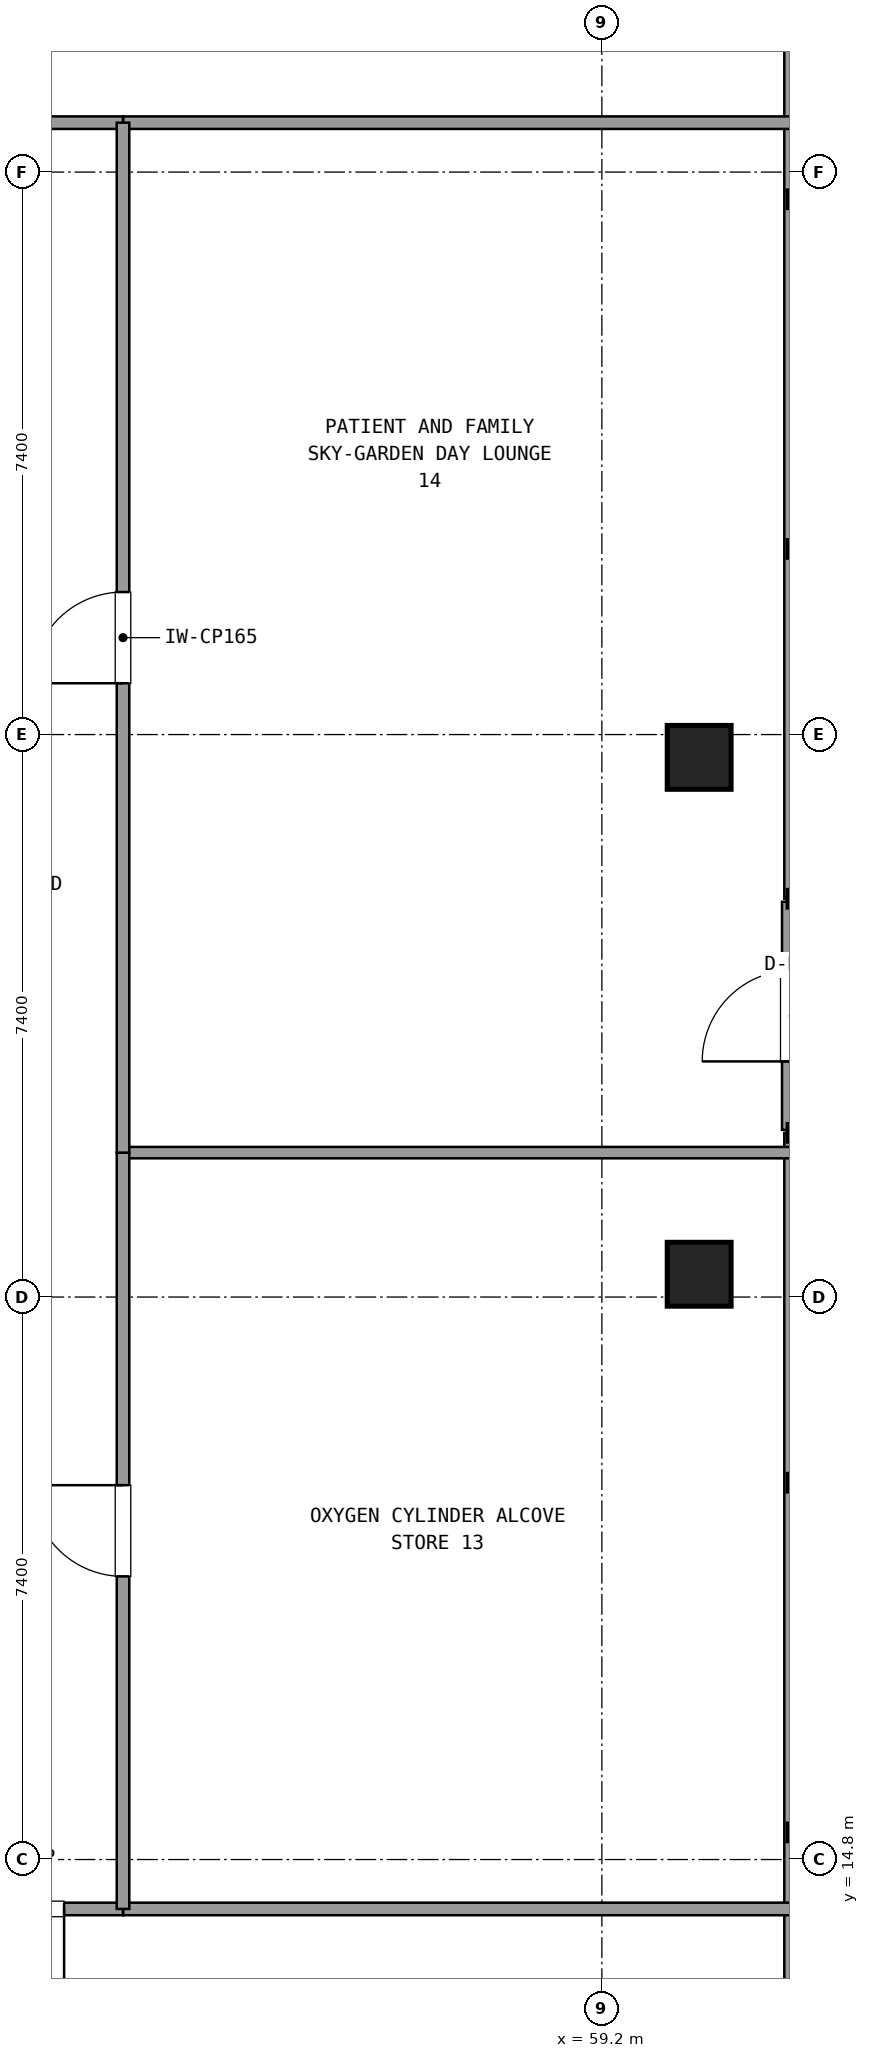
"""IFC4 building model, lengths in metres.
Left out: names, types, materials, properties, quantities, classifications, styles, units other than length and angle.
Written with IfcOpenShell. Run it as: python <this file> out.ifc"""

import sys

from ifc_helpers import new_model, si_unit, direction, frame, frame_2d, origin, origin_2d, place, context, subcontext, project, spatial, rectangle, extrude, element, fill, save


model = new_model("IFC4")
c1 = context("Model", 3, precision=1e-05, world=origin(), true_north=direction((0.0, 1.0)))
c2 = subcontext(c1, "Body", "Model", "MODEL_VIEW")
j1 = project(units=[si_unit("LENGTHUNIT", "METRE"), si_unit("PLANEANGLEUNIT", "RADIAN")], contexts=[c1])
p1 = place(None, origin())
s1 = spatial("IfcSite", under=j1, at=p1, CompositionType="ELEMENT")
p2 = place(p1, origin())
s2 = spatial("IfcBuilding", under=s1, at=p2, CompositionType="ELEMENT")
p3 = place(p2, frame((0.0, 0.0, 271.62)))
s3 = spatial("IfcBuildingStorey", under=s2, at=p3, CompositionType="ELEMENT", Elevation=271.62)
for number, where, z_axis, x_axis in (
    (1, (60.48, 22.5, 0.0), (0.0, 0.0, 1.0), (1.0, 0.0, 0.0)),
    (2, (60.48, 29.3, 0.0), (0.0, 0.0, 1.0), (1.0, 0.0, 0.0)),
):
    element("IfcColumn", number, at=place(p3, frame(where, z_axis=z_axis, x_axis=x_axis)), inside=s3, PredefinedType="COLUMN", context=c2, shape_type="SweptSolid", body=[
        extrude(rectangle(XDim=0.84, YDim=0.84, at=origin_2d()), origin(), (0.0, 0.0, 1.0), 3.6),
    ])
p4 = place(p3, frame((61.72, 24.4, 0.0), z_axis=(0.0, 0.0, 1.0), x_axis=(0.0, 1.0, 0.0)))
e3 = element("IfcWall", 3, at=p4, inside=s3, PredefinedType="SOLIDWALL", context=c2, shape_type="SweptSolid", body=[
    extrude(rectangle(XDim=3.0, YDim=0.3, at=frame_2d((1.5, 0.0))), origin(), (0.0, 0.0, 1.0), 2.69),
])
p5 = place(p4, frame((0.9, 0.0, 0.0)))
e4 = element("IfcOpeningElement", 4, at=p5, cuts=e3, PredefinedType="OPENING", context=c2, shape_type="SweptSolid", body=[
    extrude(rectangle(XDim=1.2, YDim=2.2, at=frame_2d((0.6, 1.1))), frame((0.0, 0.16, 0.0), z_axis=(0.0, -1.0, 0.0), x_axis=(1.0, 0.0, 0.0)), (0.0, 0.0, 1.0), 0.32),
])
for number, where, z_axis, x_axis in (
    (5, (61.72, 10.555, 0.0), (0.0, 0.0, 1.0), (0.0, 1.0, 0.0)),
    (6, (61.72, 27.44, 0.0), (0.0, 0.0, 1.0), (0.0, 1.0, 0.0)),
):
    element("IfcWall", number, at=place(p3, frame(where, z_axis=z_axis, x_axis=x_axis)), inside=s3, PredefinedType="SOLIDWALL", context=c2, shape_type="SweptSolid", body=[
        extrude(rectangle(XDim=13.805, YDim=0.24, at=frame_2d((6.903, 0.0))), origin(), (0.0, 0.0, 1.0), 0.85),
    ])
for number, where, z_axis, x_axis in (
    (7, (52.9, 37.65, 0.0), (0.0, 0.0, 1.0), (1.0, 0.0, 0.0)),
    (8, (52.9, 14.15, 0.0), (0.0, 0.0, 1.0), (1.0, 0.0, 0.0)),
):
    element("IfcWall", number, at=place(p3, frame(where, z_axis=z_axis, x_axis=x_axis)), inside=s3, PredefinedType="PARTITIONING", context=c2, shape_type="SweptSolid", body=[
        extrude(rectangle(XDim=8.8, YDim=0.165, at=frame_2d((4.4, 0.0))), origin(), (0.0, 0.0, 1.0), 2.61),
    ])
p6 = place(p3, frame((46.946, 37.65, 0.0), z_axis=(0.0, 0.0, 1.0), x_axis=(1.0, 0.0, 0.0)))
e9 = element("IfcWall", 9, at=p6, inside=s3, PredefinedType="PARTITIONING", context=c2, shape_type="SweptSolid", body=[
    extrude(rectangle(XDim=5.954, YDim=0.165, at=frame_2d((2.977, 0.0))), origin(), (0.0, 0.0, 1.0), 2.61),
])
p7 = place(p6, frame((2.377, 0.0, 0.0)))
e10 = element("IfcOpeningElement", 10, at=p7, cuts=e9, PredefinedType="OPENING", context=c2, shape_type="SweptSolid", body=[
    extrude(rectangle(XDim=1.2, YDim=2.15, at=frame_2d((0.6, 1.075))), frame((0.0, 0.093, 0.0), z_axis=(0.0, -1.0, 0.0), x_axis=(1.0, 0.0, 0.0)), (0.0, 0.0, 1.0), 0.185),
])
p8 = place(p3, frame((50.35, 14.15, 0.0), z_axis=(0.0, 0.0, 1.0), x_axis=(1.0, 0.0, 0.0)))
e11 = element("IfcWall", 11, at=p8, inside=s3, PredefinedType="PARTITIONING", context=c2, shape_type="SweptSolid", body=[
    extrude(rectangle(XDim=2.55, YDim=0.165, at=frame_2d((1.275, 0.0))), origin(), (0.0, 0.0, 1.0), 2.61),
])
p9 = place(p8, frame((0.775, 0.0, 0.0)))
e12 = element("IfcOpeningElement", 12, at=p9, cuts=e11, PredefinedType="OPENING", context=c2, shape_type="SweptSolid", body=[
    extrude(rectangle(XDim=1.0, YDim=2.15, at=frame_2d((0.5, 1.075))), frame((0.0, 0.093, 0.0), z_axis=(0.0, -1.0, 0.0), x_axis=(1.0, 0.0, 0.0)), (0.0, 0.0, 1.0), 0.185),
])
p10 = place(p3, frame((52.9, 24.1, 0.0), z_axis=(0.0, 0.0, 1.0), x_axis=(1.0, 0.0, 0.0)))
e13 = element("IfcWall", 13, at=p10, inside=s3, PredefinedType="PARTITIONING", context=c2, shape_type="SweptSolid", body=[
    extrude(rectangle(XDim=8.8, YDim=0.15, at=frame_2d((4.4, 0.0))), origin(), (0.0, 0.0, 1.0), 2.61),
])
p11 = place(p3, frame((52.9, 14.15, 0.0), z_axis=(0.0, 0.0, 1.0), x_axis=(0.0, 1.0, 0.0)))
e14 = element("IfcWall", 14, at=p11, inside=s3, PredefinedType="PARTITIONING", context=c2, shape_type="SweptSolid", body=[
    extrude(rectangle(XDim=9.95, YDim=0.165, at=frame_2d((4.975, 0.0))), origin(), (0.0, 0.0, 1.0), 2.61),
])
p12 = place(p11, frame((4.375, 0.0, 0.0)))
e15 = element("IfcOpeningElement", 15, at=p12, cuts=e14, PredefinedType="OPENING", context=c2, shape_type="SweptSolid", body=[
    extrude(rectangle(XDim=1.2, YDim=2.15, at=frame_2d((0.6, 1.075))), frame((0.0, 0.093, 0.0), z_axis=(0.0, -1.0, 0.0), x_axis=(1.0, 0.0, 0.0)), (0.0, 0.0, 1.0), 0.185),
])
p13 = place(p3, frame((52.9, 24.1, 0.0), z_axis=(0.0, 0.0, 1.0), x_axis=(0.0, 1.0, 0.0)))
e16 = element("IfcWall", 16, at=p13, inside=s3, PredefinedType="PARTITIONING", context=c2, shape_type="SweptSolid", body=[
    extrude(rectangle(XDim=13.55, YDim=0.165, at=frame_2d((6.775, 0.0))), origin(), (0.0, 0.0, 1.0), 2.61),
])
p14 = place(p13, frame((6.175, 0.0, 0.0)))
e17 = element("IfcOpeningElement", 17, at=p14, cuts=e16, PredefinedType="OPENING", context=c2, shape_type="SweptSolid", body=[
    extrude(rectangle(XDim=1.2, YDim=2.15, at=frame_2d((0.6, 1.075))), frame((0.0, 0.093, 0.0), z_axis=(0.0, -1.0, 0.0), x_axis=(1.0, 0.0, 0.0)), (0.0, 0.0, 1.0), 0.185),
])
p15 = place(p9, frame((1.0, 0.0, 0.0), z_axis=(0.0, 0.0, 1.0), x_axis=(-1.0, 0.0, 0.0)))
e18 = element("IfcDoor", 18, at=p15, inside=s3, OperationType="SINGLE_SWING_RIGHT", PredefinedType="DOOR", context=c2, shape_type="SweptSolid", body=[
    extrude(rectangle(XDim=1.0, YDim=2.15, at=frame_2d((0.5, 1.075))), frame((0.0, 0.025, 0.0), z_axis=(0.0, -1.0, 0.0), x_axis=(1.0, 0.0, 0.0)), (0.0, 0.0, 1.0), 0.05),
])
fill(e12, e18)
p16 = place(p12, origin())
e19 = element("IfcDoor", 19, at=p16, inside=s3, OperationType="SINGLE_SWING_RIGHT", PredefinedType="DOOR", context=c2, shape_type="SweptSolid", body=[
    extrude(rectangle(XDim=1.2, YDim=2.15, at=frame_2d((0.6, 1.075))), frame((0.0, 0.025, 0.0), z_axis=(0.0, -1.0, 0.0), x_axis=(1.0, 0.0, 0.0)), (0.0, 0.0, 1.0), 0.05),
])
fill(e15, e19)
p17 = place(p14, origin())
e20 = element("IfcDoor", 20, at=p17, inside=s3, OperationType="SINGLE_SWING_LEFT", PredefinedType="DOOR", context=c2, shape_type="SweptSolid", body=[
    extrude(rectangle(XDim=1.2, YDim=2.15, at=frame_2d((0.6, 1.075))), frame((0.0, 0.025, 0.0), z_axis=(0.0, -1.0, 0.0), x_axis=(1.0, 0.0, 0.0)), (0.0, 0.0, 1.0), 0.05),
])
fill(e17, e20)
save(model, sys.argv[1])
